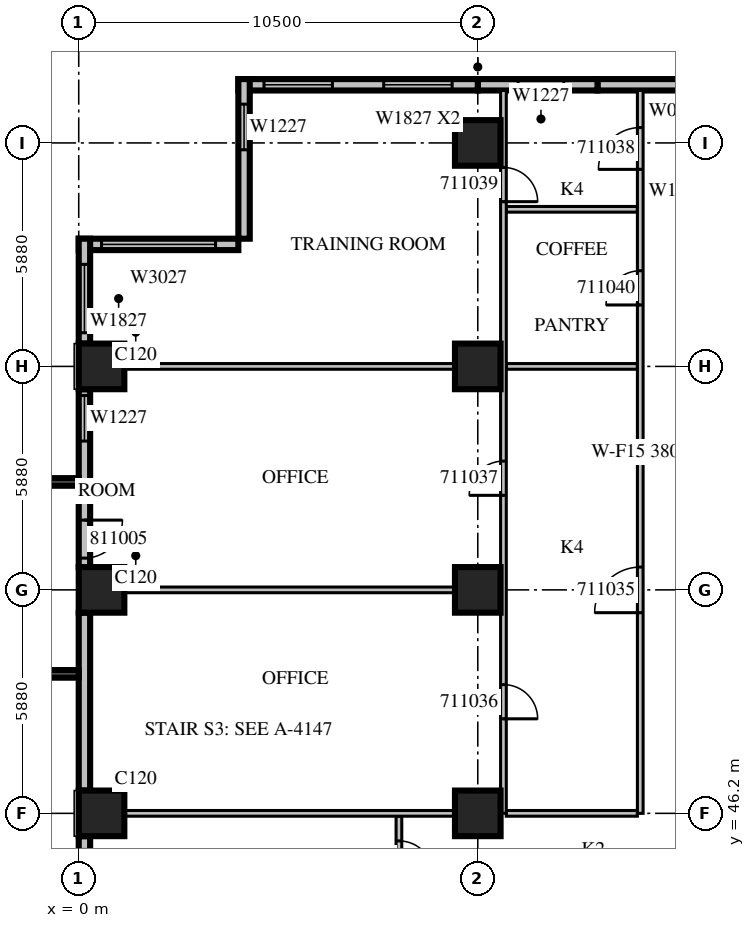
"""IFC4 building model, lengths in metres.
Left out: names, types, materials, properties, quantities, classifications, styles, units other than length and angle.
Written with IfcOpenShell. Run it as: python <this file> out.ifc"""

import sys

from ifc_helpers import new_model, si_unit, direction, frame, frame_2d, origin, origin_2d, place, context, subcontext, project, spatial, rectangle, extrude, source, transform, mapped, element, fill, save


model = new_model("IFC4")
c1 = context("Model", 3, precision=1e-05, world=origin(), true_north=direction((0.0, 1.0)))
c2 = subcontext(c1, "Body", "Model", "MODEL_VIEW")
j1 = project(units=[si_unit("LENGTHUNIT", "METRE"), si_unit("PLANEANGLEUNIT", "RADIAN")], contexts=[c1])
p1 = place(None, origin())
s1 = spatial("IfcSite", under=j1, at=p1, CompositionType="ELEMENT")
p2 = place(p1, origin())
s2 = spatial("IfcBuilding", under=s1, at=p2, CompositionType="ELEMENT")
p3 = place(p2, frame((0.0, 0.0, 57.3)))
s3 = spatial("IfcBuildingStorey", under=s2, at=p3, CompositionType="ELEMENT", Elevation=57.3)
m1 = source(origin(), c2, "Body", "SweptSolid", [
    extrude(rectangle(XDim=1.2, YDim=1.2, at=origin_2d()), origin(), (0.0, 0.0, 1.0), 4.2),
])
for number, where, z_axis, x_axis in (
    (1, (0.6, 46.2, 0.0), (0.0, 0.0, 1.0), (1.0, 0.0, 0.0)),
    (2, (10.5, 46.2, 0.0), (0.0, 0.0, 1.0), (1.0, 0.0, 0.0)),
    (3, (0.6, 52.08, 0.0), (0.0, 0.0, 1.0), (1.0, 0.0, 0.0)),
    (4, (10.5, 52.08, 0.0), (0.0, 0.0, 1.0), (1.0, 0.0, 0.0)),
    (5, (0.6, 57.96, 0.0), (0.0, 0.0, 1.0), (1.0, 0.0, 0.0)),
    (6, (10.5, 57.96, 0.0), (0.0, 0.0, 1.0), (1.0, 0.0, 0.0)),
    (7, (10.5, 63.84, 0.0), (0.0, 0.0, 1.0), (1.0, 0.0, 0.0)),
):
    element("IfcColumn", number, at=place(p3, frame(where, z_axis=z_axis, x_axis=x_axis)), inside=s3, PredefinedType="COLUMN", context=c2, shape_type="MappedRepresentation", body=[
        mapped(m1, transform((0.0, 0.0, 0.0), scale=1.0)),
    ])
m2 = source(origin(), c2, "Body", "SweptSolid", [
    extrude(rectangle(XDim=3.15, YDim=0.3, at=frame_2d((1.575, 0.0))), origin(), (0.0, 0.0, 1.0), 3.8),
])
p4 = place(p3, frame((16.8, 65.37, 0.0), z_axis=(0.0, 0.0, 1.0), x_axis=(-1.0, 0.0, 0.0)))
e8 = element("IfcWall", 8, at=p4, inside=s3, PredefinedType="STANDARD", context=c2, shape_type="MappedRepresentation", body=[
    mapped(m2, transform((0.0, 0.0, 0.0), scale=1.0)),
])
p5 = place(p3, frame((13.65, 65.37, 0.0), z_axis=(0.0, 0.0, 1.0), x_axis=(-1.0, 0.0, 0.0)))
e9 = element("IfcWall", 9, at=p5, inside=s3, PredefinedType="STANDARD", context=c2, shape_type="MappedRepresentation", body=[
    mapped(m2, transform((0.0, 0.0, 0.0), scale=1.0)),
])
m3 = source(origin(), c2, "Body", "SweptSolid", [
    extrude(rectangle(XDim=1.2, YDim=2.7, at=frame_2d((0.6, 1.35))), frame((0.0, 0.16, 0.0), z_axis=(0.0, -1.0, 0.0), x_axis=(1.0, 0.0, 0.0)), (0.0, 0.0, 1.0), 0.32),
])
p6 = place(p5, frame((0.887, 0.0, 0.6)))
e10 = element("IfcOpeningElement", 10, at=p6, cuts=e9, PredefinedType="OPENING", context=c2, shape_type="MappedRepresentation", body=[
    mapped(m3, transform((0.0, 0.0, 0.0), scale=1.0)),
])
m4 = source(origin(), c2, "Body", "SweptSolid", [
    extrude(rectangle(XDim=6.3, YDim=0.3, at=frame_2d((3.15, 0.0))), origin(), (0.0, 0.0, 1.0), 3.8),
])
p7 = place(p3, frame((10.5, 65.37, 0.0), z_axis=(0.0, 0.0, 1.0), x_axis=(-1.0, 0.0, 0.0)))
e11 = element("IfcWall", 11, at=p7, inside=s3, PredefinedType="STANDARD", context=c2, shape_type="MappedRepresentation", body=[
    mapped(m4, transform((0.0, 0.0, 0.0), scale=1.0)),
])
m5 = source(origin(), c2, "Body", "SweptSolid", [
    extrude(rectangle(XDim=1.8, YDim=2.7, at=frame_2d((0.9, 1.35))), frame((0.0, 0.16, 0.0), z_axis=(0.0, -1.0, 0.0), x_axis=(1.0, 0.0, 0.0)), (0.0, 0.0, 1.0), 0.32),
])
p8 = place(p7, frame((0.675, 0.0, 0.6)))
e12 = element("IfcOpeningElement", 12, at=p8, cuts=e11, PredefinedType="OPENING", context=c2, shape_type="MappedRepresentation", body=[
    mapped(m5, transform((0.0, 0.0, 0.0), scale=1.0)),
])
p9 = place(p7, frame((3.825, 0.0, 0.6)))
e13 = element("IfcOpeningElement", 13, at=p9, cuts=e11, PredefinedType="OPENING", context=c2, shape_type="MappedRepresentation", body=[
    mapped(m5, transform((0.0, 0.0, 0.0), scale=1.0)),
])
m6 = source(origin(), c2, "Body", "SweptSolid", [
    extrude(rectangle(XDim=4.2, YDim=0.3, at=frame_2d((2.1, 0.0))), origin(), (0.0, 0.0, 1.0), 3.8),
])
p10 = place(p3, frame((4.35, 65.52, 0.0), z_axis=(0.0, 0.0, 1.0), x_axis=(0.0, -1.0, 0.0)))
e14 = element("IfcWall", 14, at=p10, inside=s3, PredefinedType="STANDARD", context=c2, shape_type="MappedRepresentation", body=[
    mapped(m6, transform((0.0, 0.0, 0.0), scale=1.0)),
])
p11 = place(p10, frame((0.66, 0.0, 0.6)))
e15 = element("IfcOpeningElement", 15, at=p11, cuts=e14, PredefinedType="OPENING", context=c2, shape_type="MappedRepresentation", body=[
    mapped(m3, transform((0.0, 0.0, 0.0), scale=1.0)),
])
p12 = place(p3, frame((4.2, 61.17, 0.0), z_axis=(0.0, 0.0, 1.0), x_axis=(-1.0, 0.0, 0.0)))
e16 = element("IfcWall", 16, at=p12, inside=s3, PredefinedType="STANDARD", context=c2, shape_type="MappedRepresentation", body=[
    mapped(m6, transform((0.0, 0.0, 0.0), scale=1.0)),
])
m7 = source(origin(), c2, "Body", "SweptSolid", [
    extrude(rectangle(XDim=3.0, YDim=2.7, at=frame_2d((1.5, 1.35))), frame((0.0, 0.16, 0.0), z_axis=(0.0, -1.0, 0.0), x_axis=(1.0, 0.0, 0.0)), (0.0, 0.0, 1.0), 0.32),
])
p13 = place(p12, frame((0.6, 0.0, 0.6)))
e17 = element("IfcOpeningElement", 17, at=p13, cuts=e16, PredefinedType="OPENING", context=c2, shape_type="MappedRepresentation", body=[
    mapped(m7, transform((0.0, 0.0, 0.0), scale=1.0)),
])
m8 = source(origin(), c2, "Body", "SweptSolid", [
    extrude(rectangle(XDim=2.76, YDim=0.3, at=frame_2d((1.38, 0.0))), origin(), (0.0, 0.0, 1.0), 3.8),
])
p14 = place(p3, frame((0.15, 61.32, 0.0), z_axis=(0.0, 0.0, 1.0), x_axis=(0.0, -1.0, 0.0)))
e18 = element("IfcWall", 18, at=p14, inside=s3, PredefinedType="STANDARD", context=c2, shape_type="MappedRepresentation", body=[
    mapped(m8, transform((0.0, 0.0, 0.0), scale=1.0)),
])
p15 = place(p14, frame((0.675, 0.0, 0.6)))
e19 = element("IfcOpeningElement", 19, at=p15, cuts=e18, PredefinedType="OPENING", context=c2, shape_type="MappedRepresentation", body=[
    mapped(m5, transform((0.0, 0.0, 0.0), scale=1.0)),
])
m9 = source(origin(), c2, "Body", "SweptSolid", [
    extrude(rectangle(XDim=4.68, YDim=0.3, at=frame_2d((2.34, 0.0))), origin(), (0.0, 0.0, 1.0), 3.8),
])
p16 = place(p3, frame((0.15, 57.36, 0.0), z_axis=(0.0, 0.0, 1.0), x_axis=(0.0, -1.0, 0.0)))
e20 = element("IfcWall", 20, at=p16, inside=s3, PredefinedType="STANDARD", context=c2, shape_type="MappedRepresentation", body=[
    mapped(m9, transform((0.0, 0.0, 0.0), scale=1.0)),
])
p17 = place(p16, frame((0.165, 0.0, 0.6)))
e21 = element("IfcOpeningElement", 21, at=p17, cuts=e20, PredefinedType="OPENING", context=c2, shape_type="MappedRepresentation", body=[
    mapped(m3, transform((0.0, 0.0, 0.0), scale=1.0)),
])
m10 = source(origin(), c2, "Body", "SweptSolid", [
    extrude(rectangle(XDim=1.0, YDim=2.1, at=frame_2d((0.5, 1.05))), frame((0.0, 0.16, 0.0), z_axis=(0.0, -1.0, 0.0), x_axis=(1.0, 0.0, 0.0)), (0.0, 0.0, 1.0), 0.32),
])
p18 = place(p16, frame((3.444, 0.0, 0.0)))
e22 = element("IfcOpeningElement", 22, at=p18, cuts=e20, PredefinedType="OPENING", context=c2, shape_type="MappedRepresentation", body=[
    mapped(m10, transform((0.0, 0.0, 0.0), scale=1.0)),
])
p19 = place(p3, frame((0.15, 51.48, 0.0), z_axis=(0.0, 0.0, 1.0), x_axis=(0.0, -1.0, 0.0)))
e23 = element("IfcWall", 23, at=p19, inside=s3, PredefinedType="STANDARD", context=c2, shape_type="MappedRepresentation", body=[
    mapped(m9, transform((0.0, 0.0, 0.0), scale=1.0)),
])
m11 = source(origin(), c2, "Body", "SweptSolid", [
    extrude(rectangle(XDim=1.6, YDim=0.3, at=frame_2d((0.8, 0.0))), origin(), (0.0, 0.0, 1.0), 3.8),
])
p20 = place(p3, frame((0.15, 45.6, 0.0), z_axis=(0.0, 0.0, 1.0), x_axis=(0.0, -1.0, 0.0)))
e24 = element("IfcWall", 24, at=p20, inside=s3, PredefinedType="STANDARD", context=c2, shape_type="MappedRepresentation", body=[
    mapped(m11, transform((0.0, 0.0, 0.0), scale=1.0)),
])
m12 = source(origin(), c2, "Body", "SweptSolid", [
    extrude(rectangle(XDim=0.9, YDim=2.7, at=frame_2d((0.45, 1.35))), frame((0.0, 0.16, 0.0), z_axis=(0.0, -1.0, 0.0), x_axis=(1.0, 0.0, 0.0)), (0.0, 0.0, 1.0), 0.32),
])
p21 = place(p20, frame((0.35, 0.0, 0.6)))
e25 = element("IfcOpeningElement", 25, at=p21, cuts=e24, PredefinedType="OPENING", context=c2, shape_type="MappedRepresentation", body=[
    mapped(m12, transform((0.0, 0.0, 0.0), scale=1.0)),
])
m13 = source(origin(), c2, "Body", "SweptSolid", [
    extrude(rectangle(XDim=3.9, YDim=0.2, at=frame_2d((1.95, 0.0))), origin(), (0.0, 0.0, 1.0), 3.79),
])
p22 = place(p3, frame((0.0, 54.92, 0.0), z_axis=(0.0, 0.0, 1.0), x_axis=(-1.0, 0.0, 0.0)))
e26 = element("IfcWall", 26, at=p22, inside=s3, PredefinedType="SOLIDWALL", context=c2, shape_type="MappedRepresentation", body=[
    mapped(m13, transform((0.0, 0.0, 0.0), scale=1.0)),
])
m14 = source(origin(), c2, "Body", "SweptSolid", [
    extrude(rectangle(XDim=2.4, YDim=2.7, at=frame_2d((1.2, 1.35))), frame((0.0, 0.11, 0.0), z_axis=(0.0, -1.0, 0.0), x_axis=(1.0, 0.0, 0.0)), (0.0, 0.0, 1.0), 0.22),
])
p23 = place(p22, frame((0.75, 0.0, 0.6)))
e27 = element("IfcOpeningElement", 27, at=p23, cuts=e26, PredefinedType="OPENING", context=c2, shape_type="MappedRepresentation", body=[
    mapped(m14, transform((0.0, 0.0, 0.0), scale=1.0)),
])
p24 = place(p3, frame((0.0, 49.87, 0.0), z_axis=(0.0, 0.0, 1.0), x_axis=(-1.0, 0.0, 0.0)))
e28 = element("IfcWall", 28, at=p24, inside=s3, PredefinedType="SOLIDWALL", context=c2, shape_type="MappedRepresentation", body=[
    mapped(m13, transform((0.0, 0.0, 0.0), scale=1.0)),
])
p25 = place(p24, frame((0.75, 0.0, 0.6)))
e29 = element("IfcOpeningElement", 29, at=p25, cuts=e28, PredefinedType="OPENING", context=c2, shape_type="MappedRepresentation", body=[
    mapped(m14, transform((0.0, 0.0, 0.0), scale=1.0)),
])
m15 = source(origin(), c2, "Body", "SweptSolid", [
    extrude(rectangle(XDim=2.2, YDim=0.15, at=frame_2d((1.1, 0.0))), origin(), (0.0, 0.0, 1.0), 3.8),
])
p26 = place(p3, frame((8.425, 43.925, 0.0), z_axis=(0.0, 0.0, 1.0), x_axis=(0.0, 1.0, 0.0)))
e30 = element("IfcWall", 30, at=p26, inside=s3, PredefinedType="PARTITIONING", context=c2, shape_type="MappedRepresentation", body=[
    mapped(m15, transform((0.0, 0.0, 0.0), scale=1.0)),
])
m16 = source(origin(), c2, "Body", "SweptSolid", [
    extrude(rectangle(XDim=0.9, YDim=2.1, at=frame_2d((0.45, 1.05))), frame((0.0, 0.085, 0.0), z_axis=(0.0, -1.0, 0.0), x_axis=(1.0, 0.0, 0.0)), (0.0, 0.0, 1.0), 0.17),
])
p27 = place(p26, frame((0.65, 0.0, 0.0)))
e31 = element("IfcOpeningElement", 31, at=p27, cuts=e30, PredefinedType="OPENING", context=c2, shape_type="MappedRepresentation", body=[
    mapped(m16, transform((0.0, 0.0, 0.0), scale=1.0)),
])
m17 = source(origin(), c2, "Body", "SweptSolid", [
    extrude(rectangle(XDim=8.702, YDim=0.15, at=frame_2d((4.351, 0.0))), origin(), (0.0, 0.0, 1.0), 3.8),
])
p28 = place(p3, frame((9.901, 52.08, 0.0), z_axis=(0.0, 0.0, 1.0), x_axis=(-1.0, 0.0, 0.0)))
e32 = element("IfcWall", 32, at=p28, inside=s3, PredefinedType="PARTITIONING", context=c2, shape_type="MappedRepresentation", body=[
    mapped(m17, transform((0.0, 0.0, 0.0), scale=1.0)),
])
m18 = source(origin(), c2, "Body", "SweptSolid", [
    extrude(rectangle(XDim=3.45, YDim=0.15, at=frame_2d((1.725, 0.0))), origin(), (0.0, 0.0, 1.0), 3.8),
])
p29 = place(p3, frame((14.7, 62.093, 0.0), z_axis=(0.0, 0.0, 1.0), x_axis=(-1.0, 0.0, 0.0)))
e33 = element("IfcWall", 33, at=p29, inside=s3, PredefinedType="PARTITIONING", context=c2, shape_type="MappedRepresentation", body=[
    mapped(m18, transform((0.0, 0.0, 0.0), scale=1.0)),
])
p30 = place(p3, frame((9.901, 46.2, 0.0), z_axis=(0.0, 0.0, 1.0), x_axis=(-1.0, 0.0, 0.0)))
e34 = element("IfcWall", 34, at=p30, inside=s3, PredefinedType="PARTITIONING", context=c2, shape_type="MappedRepresentation", body=[
    mapped(m17, transform((0.0, 0.0, 0.0), scale=1.0)),
])
p31 = place(p3, frame((14.7, 46.2, 0.0), z_axis=(0.0, 0.0, 1.0), x_axis=(-1.0, 0.0, 0.0)))
e35 = element("IfcWall", 35, at=p31, inside=s3, PredefinedType="PARTITIONING", context=c2, shape_type="MappedRepresentation", body=[
    mapped(m18, transform((0.0, 0.0, 0.0), scale=1.0)),
])
p32 = place(p3, frame((9.901, 57.96, 0.0), z_axis=(0.0, 0.0, 1.0), x_axis=(-1.0, 0.0, 0.0)))
e36 = element("IfcWall", 36, at=p32, inside=s3, PredefinedType="PARTITIONING", context=c2, shape_type="MappedRepresentation", body=[
    mapped(m17, transform((0.0, 0.0, 0.0), scale=1.0)),
])
p33 = place(p3, frame((14.7, 57.96, 0.0), z_axis=(0.0, 0.0, 1.0), x_axis=(-1.0, 0.0, 0.0)))
e37 = element("IfcWall", 37, at=p33, inside=s3, PredefinedType="PARTITIONING", context=c2, shape_type="MappedRepresentation", body=[
    mapped(m18, transform((0.0, 0.0, 0.0), scale=1.0)),
])
m19 = source(origin(), c2, "Body", "SweptSolid", [
    extrude(rectangle(XDim=19.02, YDim=0.15, at=frame_2d((9.51, 0.0))), origin(), (0.0, 0.0, 1.0), 3.8),
])
p34 = place(p3, frame((11.175, 46.2, 0.0), z_axis=(0.0, 0.0, 1.0), x_axis=(0.0, 1.0, 0.0)))
e38 = element("IfcWall", 38, at=p34, inside=s3, PredefinedType="PARTITIONING", context=c2, shape_type="MappedRepresentation", body=[
    mapped(m19, transform((0.0, 0.0, 0.0), scale=1.0)),
])
p35 = place(p34, frame((2.487, 0.0, 0.0)))
e39 = element("IfcOpeningElement", 39, at=p35, cuts=e38, PredefinedType="OPENING", context=c2, shape_type="MappedRepresentation", body=[
    mapped(m16, transform((0.0, 0.0, 0.0), scale=1.0)),
])
p36 = place(p34, frame((8.367, 0.0, 0.0)))
e40 = element("IfcOpeningElement", 40, at=p36, cuts=e38, PredefinedType="OPENING", context=c2, shape_type="MappedRepresentation", body=[
    mapped(m16, transform((0.0, 0.0, 0.0), scale=1.0)),
])
p37 = place(p34, frame((16.094, 0.0, 0.0)))
e41 = element("IfcOpeningElement", 41, at=p37, cuts=e38, PredefinedType="OPENING", context=c2, shape_type="MappedRepresentation", body=[
    mapped(m16, transform((0.0, 0.0, 0.0), scale=1.0)),
])
p38 = place(p3, frame((14.775, 46.2, 0.0), z_axis=(0.0, 0.0, 1.0), x_axis=(0.0, 1.0, 0.0)))
e42 = element("IfcWall", 42, at=p38, inside=s3, PredefinedType="PARTITIONING", context=c2, shape_type="MappedRepresentation", body=[
    mapped(m19, transform((0.0, 0.0, 0.0), scale=1.0)),
])
m20 = source(origin(), c2, "Body", "SweptSolid", [
    extrude(rectangle(XDim=1.2, YDim=2.1, at=frame_2d((0.6, 1.05))), frame((0.0, 0.085, 0.0), z_axis=(0.0, -1.0, 0.0), x_axis=(1.0, 0.0, 0.0)), (0.0, 0.0, 1.0), 0.17),
])
p39 = place(p38, frame((5.28, 0.0, 0.0)))
e43 = element("IfcOpeningElement", 43, at=p39, cuts=e42, PredefinedType="OPENING", context=c2, shape_type="MappedRepresentation", body=[
    mapped(m20, transform((0.0, 0.0, 0.0), scale=1.0)),
])
m21 = source(origin(), c2, "Body", "SweptSolid", [
    extrude(rectangle(XDim=1.1, YDim=2.1, at=frame_2d((0.55, 1.05))), frame((0.0, 0.085, 0.0), z_axis=(0.0, -1.0, 0.0), x_axis=(1.0, 0.0, 0.0)), (0.0, 0.0, 1.0), 0.17),
])
p40 = place(p38, frame((16.944, 0.0, 0.0)))
e44 = element("IfcOpeningElement", 44, at=p40, cuts=e42, PredefinedType="OPENING", context=c2, shape_type="MappedRepresentation", body=[
    mapped(m21, transform((0.0, 0.0, 0.0), scale=1.0)),
])
p41 = place(p38, frame((13.377, 0.0, 0.0)))
e45 = element("IfcOpeningElement", 45, at=p41, cuts=e42, PredefinedType="OPENING", context=c2, shape_type="MappedRepresentation", body=[
    mapped(m16, transform((0.0, 0.0, 0.0), scale=1.0)),
])
m22 = source(origin(), c2, "Body", "SweptSolid", [
    extrude(rectangle(XDim=1.2, YDim=2.7, at=frame_2d((0.6, 1.35))), frame((0.0, 0.03, 0.0), z_axis=(0.0, -1.0, 0.0), x_axis=(1.0, 0.0, 0.0)), (0.0, 0.0, 1.0), 0.06),
])
p42 = place(p6, origin())
e46 = element("IfcWindow", 46, at=p42, inside=s3, PartitioningType="SINGLE_PANEL", PredefinedType="WINDOW", context=c2, shape_type="MappedRepresentation", body=[
    mapped(m22, transform((0.0, 0.0, 0.0), scale=1.0)),
])
fill(e10, e46)
m23 = source(origin(), c2, "Body", "SweptSolid", [
    extrude(rectangle(XDim=1.8, YDim=2.7, at=frame_2d((0.9, 1.35))), frame((0.0, 0.03, 0.0), z_axis=(0.0, -1.0, 0.0), x_axis=(1.0, 0.0, 0.0)), (0.0, 0.0, 1.0), 0.06),
])
p43 = place(p8, origin())
e47 = element("IfcWindow", 47, at=p43, inside=s3, PartitioningType="SINGLE_PANEL", PredefinedType="WINDOW", context=c2, shape_type="MappedRepresentation", body=[
    mapped(m23, transform((0.0, 0.0, 0.0), scale=1.0)),
])
fill(e12, e47)
p44 = place(p9, origin())
e48 = element("IfcWindow", 48, at=p44, inside=s3, PartitioningType="SINGLE_PANEL", PredefinedType="WINDOW", context=c2, shape_type="MappedRepresentation", body=[
    mapped(m23, transform((0.0, 0.0, 0.0), scale=1.0)),
])
fill(e13, e48)
p45 = place(p11, origin())
e49 = element("IfcWindow", 49, at=p45, inside=s3, PartitioningType="SINGLE_PANEL", PredefinedType="WINDOW", context=c2, shape_type="MappedRepresentation", body=[
    mapped(m22, transform((0.0, 0.0, 0.0), scale=1.0)),
])
fill(e15, e49)
m24 = source(origin(), c2, "Body", "SweptSolid", [
    extrude(rectangle(XDim=3.0, YDim=2.7, at=frame_2d((1.5, 1.35))), frame((0.0, 0.03, 0.0), z_axis=(0.0, -1.0, 0.0), x_axis=(1.0, 0.0, 0.0)), (0.0, 0.0, 1.0), 0.06),
])
p46 = place(p13, origin())
e50 = element("IfcWindow", 50, at=p46, inside=s3, PartitioningType="SINGLE_PANEL", PredefinedType="WINDOW", context=c2, shape_type="MappedRepresentation", body=[
    mapped(m24, transform((0.0, 0.0, 0.0), scale=1.0)),
])
fill(e17, e50)
p47 = place(p15, origin())
e51 = element("IfcWindow", 51, at=p47, inside=s3, PartitioningType="SINGLE_PANEL", PredefinedType="WINDOW", context=c2, shape_type="MappedRepresentation", body=[
    mapped(m23, transform((0.0, 0.0, 0.0), scale=1.0)),
])
fill(e19, e51)
p48 = place(p17, origin())
e52 = element("IfcWindow", 52, at=p48, inside=s3, PartitioningType="SINGLE_PANEL", PredefinedType="WINDOW", context=c2, shape_type="MappedRepresentation", body=[
    mapped(m22, transform((0.0, 0.0, 0.0), scale=1.0)),
])
fill(e21, e52)
m25 = source(origin(), c2, "Body", "SweptSolid", [
    extrude(rectangle(XDim=0.9, YDim=2.1, at=frame_2d((0.45, 1.05))), frame((0.0, 0.025, 0.0), z_axis=(0.0, -1.0, 0.0), x_axis=(1.0, 0.0, 0.0)), (0.0, 0.0, 1.0), 0.05),
])
p49 = place(p27, origin())
e53 = element("IfcDoor", 53, at=p49, inside=s3, OperationType="SINGLE_SWING_RIGHT", PredefinedType="DOOR", context=c2, shape_type="MappedRepresentation", body=[
    mapped(m25, transform((0.0, 0.0, 0.0), scale=1.0)),
])
fill(e31, e53)
m26 = source(origin(), c2, "Body", "SweptSolid", [
    extrude(rectangle(XDim=1.2, YDim=2.1, at=frame_2d((0.6, 1.05))), frame((0.0, 0.025, 0.0), z_axis=(0.0, -1.0, 0.0), x_axis=(1.0, 0.0, 0.0)), (0.0, 0.0, 1.0), 0.05),
])
p50 = place(p39, origin())
e54 = element("IfcDoor", 54, at=p50, inside=s3, OperationType="SINGLE_SWING_LEFT", PredefinedType="DOOR", context=c2, shape_type="MappedRepresentation", body=[
    mapped(m26, transform((0.0, 0.0, 0.0), scale=1.0)),
])
fill(e43, e54)
p51 = place(p35, origin())
e55 = element("IfcDoor", 55, at=p51, inside=s3, OperationType="SINGLE_SWING_RIGHT", PredefinedType="DOOR", context=c2, shape_type="MappedRepresentation", body=[
    mapped(m25, transform((0.0, 0.0, 0.0), scale=1.0)),
])
fill(e39, e55)
p52 = place(p36, origin())
e56 = element("IfcDoor", 56, at=p52, inside=s3, OperationType="SINGLE_SWING_LEFT", PredefinedType="DOOR", context=c2, shape_type="MappedRepresentation", body=[
    mapped(m25, transform((0.0, 0.0, 0.0), scale=1.0)),
])
fill(e40, e56)
m27 = source(origin(), c2, "Body", "SweptSolid", [
    extrude(rectangle(XDim=1.1, YDim=2.1, at=frame_2d((0.55, 1.05))), frame((0.0, 0.025, 0.0), z_axis=(0.0, -1.0, 0.0), x_axis=(1.0, 0.0, 0.0)), (0.0, 0.0, 1.0), 0.05),
])
p53 = place(p40, origin())
e57 = element("IfcDoor", 57, at=p53, inside=s3, OperationType="SINGLE_SWING_LEFT", PredefinedType="DOOR", context=c2, shape_type="MappedRepresentation", body=[
    mapped(m27, transform((0.0, 0.0, 0.0), scale=1.0)),
])
fill(e44, e57)
p54 = place(p37, origin())
e58 = element("IfcDoor", 58, at=p54, inside=s3, OperationType="SINGLE_SWING_RIGHT", PredefinedType="DOOR", context=c2, shape_type="MappedRepresentation", body=[
    mapped(m25, transform((0.0, 0.0, 0.0), scale=1.0)),
])
fill(e41, e58)
p55 = place(p41, origin())
e59 = element("IfcDoor", 59, at=p55, inside=s3, OperationType="SINGLE_SWING_LEFT", PredefinedType="DOOR", context=c2, shape_type="MappedRepresentation", body=[
    mapped(m25, transform((0.0, 0.0, 0.0), scale=1.0)),
])
fill(e45, e59)
m28 = source(origin(), c2, "Body", "SweptSolid", [
    extrude(rectangle(XDim=1.0, YDim=2.1, at=frame_2d((0.5, 1.05))), frame((0.0, 0.025, 0.0), z_axis=(0.0, -1.0, 0.0), x_axis=(1.0, 0.0, 0.0)), (0.0, 0.0, 1.0), 0.05),
])
p56 = place(p18, origin())
e60 = element("IfcDoor", 60, at=p56, inside=s3, OperationType="SINGLE_SWING_LEFT", PredefinedType="DOOR", context=c2, shape_type="MappedRepresentation", body=[
    mapped(m28, transform((0.0, 0.0, 0.0), scale=1.0)),
])
fill(e22, e60)
save(model, sys.argv[1])
